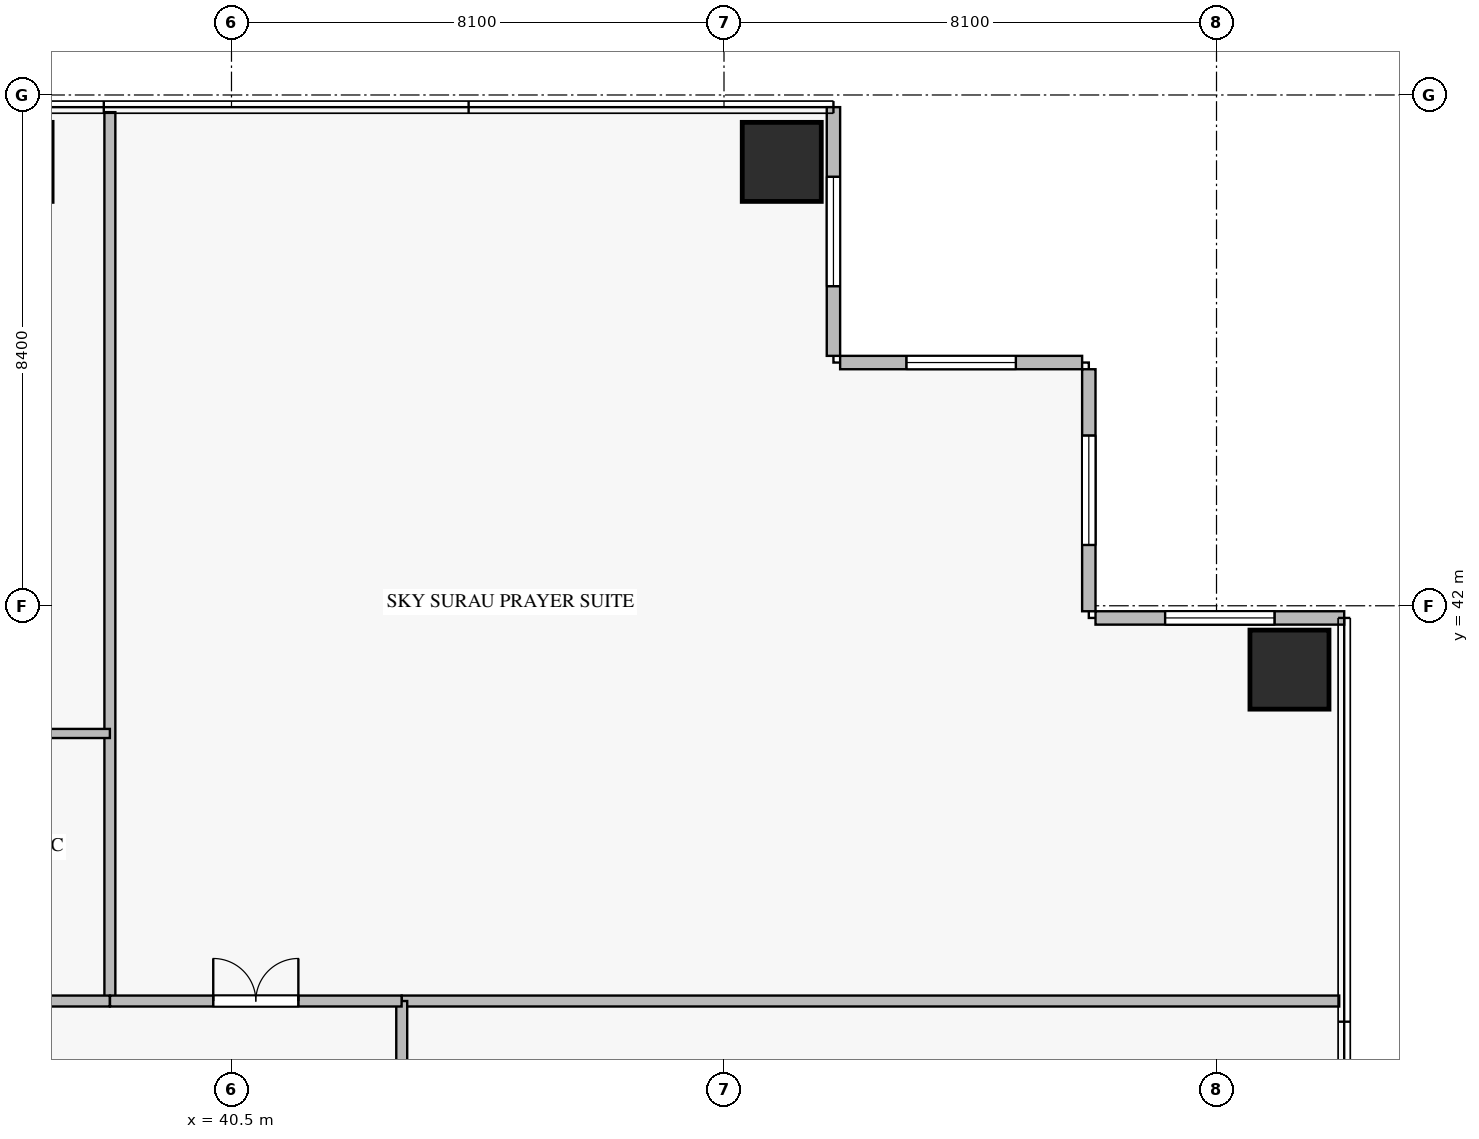
"""IFC4 building model, lengths in metres.
Left out: names, types, materials, properties, quantities, classifications, styles, units other than length and angle.
Written with IfcOpenShell. Run it as: python <this file> out.ifc"""

import sys

from ifc_helpers import new_model, si_unit, direction, frame, frame_2d, origin, origin_2d, place, context, subcontext, project, spatial, rectangle, extrude, source, transform, mapped, element, fill, save


model = new_model("IFC4")
c1 = context("Model", 3, precision=1e-05, world=origin(), true_north=direction((0.0, 1.0)))
c2 = subcontext(c1, "Body", "Model", "MODEL_VIEW")
j1 = project(units=[si_unit("LENGTHUNIT", "METRE"), si_unit("PLANEANGLEUNIT", "RADIAN")], contexts=[c1])
p1 = place(None, origin())
s1 = spatial("IfcSite", under=j1, at=p1, CompositionType="ELEMENT")
p2 = place(p1, origin())
s2 = spatial("IfcBuilding", under=s1, at=p2, CompositionType="ELEMENT")
p3 = place(p2, frame((0.0, 0.0, 115.2)))
s3 = spatial("IfcBuildingStorey", under=s2, at=p3, CompositionType="ELEMENT", Elevation=115.2)
m1 = source(origin(), c2, "Body", "SweptSolid", [
    extrude(rectangle(XDim=1.3, YDim=1.3, at=origin_2d()), origin(), (0.0, 0.0, 1.0), 4.87),
])
for number, where, z_axis, x_axis in (
    (1, (49.55, 49.3, -0.36), (0.0, 0.0, 1.0), (1.0, 0.0, 0.0)),
    (2, (57.9, 40.95, -0.36), (0.0, 0.0, 1.0), (1.0, 0.0, 0.0)),
):
    element("IfcColumn", number, at=place(p3, frame(where, z_axis=z_axis, x_axis=x_axis)), inside=s3, PredefinedType="COLUMN", context=c2, shape_type="MappedRepresentation", body=[
        mapped(m1, transform((0.0, 0.0, 0.0), scale=1.0)),
    ])
p4 = place(p3, frame((58.8, 41.8, 0.0), z_axis=(0.0, 0.0, 1.0), x_axis=(-1.0, 0.0, 0.0)))
e3 = element("IfcWall", 3, at=p4, inside=s3, PredefinedType="ELEMENTEDWALL", context=c2, shape_type="SweptSolid", body=[
    extrude(rectangle(XDim=4.09, YDim=0.22, at=frame_2d((2.045, 0.0))), origin(), (0.0, 0.0, 1.0), 4.495),
])
p5 = place(p4, frame((1.145, 0.0, 0.65)))
e4 = element("IfcOpeningElement", 4, at=p5, cuts=e3, PredefinedType="OPENING", context=c2, shape_type="SweptSolid", body=[
    extrude(rectangle(XDim=1.8, YDim=2.1, at=frame_2d((0.9, 1.05))), frame((0.0, 0.12, 0.0), z_axis=(0.0, -1.0, 0.0), x_axis=(1.0, 0.0, 0.0)), (0.0, 0.0, 1.0), 0.24),
])
p6 = place(p3, frame((54.6, 41.91, 0.0), z_axis=(0.0, 0.0, 1.0), x_axis=(0.0, 1.0, 0.0)))
e5 = element("IfcWall", 5, at=p6, inside=s3, PredefinedType="ELEMENTEDWALL", context=c2, shape_type="SweptSolid", body=[
    extrude(rectangle(XDim=3.98, YDim=0.22, at=frame_2d((1.99, 0.0))), origin(), (0.0, 0.0, 1.0), 4.495),
])
p7 = place(p6, frame((1.09, 0.0, 0.65)))
e6 = element("IfcOpeningElement", 6, at=p7, cuts=e5, PredefinedType="OPENING", context=c2, shape_type="SweptSolid", body=[
    extrude(rectangle(XDim=1.8, YDim=2.1, at=frame_2d((0.9, 1.05))), frame((0.0, 0.12, 0.0), z_axis=(0.0, -1.0, 0.0), x_axis=(1.0, 0.0, 0.0)), (0.0, 0.0, 1.0), 0.24),
])
p8 = place(p3, frame((54.49, 46.0, 0.0), z_axis=(0.0, 0.0, 1.0), x_axis=(-1.0, 0.0, 0.0)))
e7 = element("IfcWall", 7, at=p8, inside=s3, PredefinedType="ELEMENTEDWALL", context=c2, shape_type="SweptSolid", body=[
    extrude(rectangle(XDim=3.98, YDim=0.22, at=frame_2d((1.99, 0.0))), origin(), (0.0, 0.0, 1.0), 4.495),
])
p9 = place(p8, frame((1.09, 0.0, 0.65)))
e8 = element("IfcOpeningElement", 8, at=p9, cuts=e7, PredefinedType="OPENING", context=c2, shape_type="SweptSolid", body=[
    extrude(rectangle(XDim=1.8, YDim=2.1, at=frame_2d((0.9, 1.05))), frame((0.0, 0.12, 0.0), z_axis=(0.0, -1.0, 0.0), x_axis=(1.0, 0.0, 0.0)), (0.0, 0.0, 1.0), 0.24),
])
p10 = place(p3, frame((50.4, 46.11, 0.0), z_axis=(0.0, 0.0, 1.0), x_axis=(0.0, 1.0, 0.0)))
e9 = element("IfcWall", 9, at=p10, inside=s3, PredefinedType="ELEMENTEDWALL", context=c2, shape_type="SweptSolid", body=[
    extrude(rectangle(XDim=4.09, YDim=0.22, at=frame_2d((2.045, 0.0))), origin(), (0.0, 0.0, 1.0), 4.495),
])
p11 = place(p10, frame((1.145, 0.0, 0.65)))
e10 = element("IfcOpeningElement", 10, at=p11, cuts=e9, PredefinedType="OPENING", context=c2, shape_type="SweptSolid", body=[
    extrude(rectangle(XDim=1.8, YDim=2.1, at=frame_2d((0.9, 1.05))), frame((0.0, 0.12, 0.0), z_axis=(0.0, -1.0, 0.0), x_axis=(1.0, 0.0, 0.0)), (0.0, 0.0, 1.0), 0.24),
])
p12 = place(p3, frame((43.3, 35.5, 0.0), z_axis=(0.0, 0.0, 1.0), x_axis=(1.0, 0.0, 0.0)))
e11 = element("IfcWall", 11, at=p12, inside=s3, PredefinedType="PARTITIONING", context=c2, shape_type="SweptSolid", body=[
    extrude(rectangle(XDim=15.418, YDim=0.18, at=frame_2d((7.709, 0.0))), origin(), (0.0, 0.0, 1.0), 4.51),
])
p13 = place(p3, frame((43.3, 14.9, 0.0), z_axis=(0.0, 0.0, 1.0), x_axis=(0.0, 1.0, 0.0)))
e12 = element("IfcWall", 12, at=p13, inside=s3, PredefinedType="PARTITIONING", context=c2, shape_type="SweptSolid", body=[
    extrude(rectangle(XDim=20.6, YDim=0.18, at=frame_2d((10.3, 0.0))), origin(), (0.0, 0.0, 1.0), 4.51),
])
p14 = place(p13, frame((9.55, 0.0, 0.0)))
e13 = element("IfcOpeningElement", 13, at=p14, cuts=e12, PredefinedType="OPENING", context=c2, shape_type="SweptSolid", body=[
    extrude(rectangle(XDim=1.5, YDim=2.25, at=frame_2d((0.75, 1.125))), frame((0.0, 0.1, 0.0), z_axis=(0.0, -1.0, 0.0), x_axis=(1.0, 0.0, 0.0)), (0.0, 0.0, 1.0), 0.2),
])
p15 = place(p3, frame((38.5, 35.5, 0.0), z_axis=(0.0, 0.0, 1.0), x_axis=(0.0, 1.0, 0.0)))
e14 = element("IfcWall", 14, at=p15, inside=s3, PredefinedType="PARTITIONING", context=c2, shape_type="SweptSolid", body=[
    extrude(rectangle(XDim=14.618, YDim=0.18, at=frame_2d((7.309, 0.0))), origin(), (0.0, 0.0, 1.0), 4.51),
])
p16 = place(p3, frame((33.302, 35.5, 0.0), z_axis=(0.0, 0.0, 1.0), x_axis=(1.0, 0.0, 0.0)))
e15 = element("IfcWall", 15, at=p16, inside=s3, PredefinedType="PARTITIONING", context=c2, shape_type="SweptSolid", body=[
    extrude(rectangle(XDim=5.198, YDim=0.18, at=frame_2d((2.599, 0.0))), origin(), (0.0, 0.0, 1.0), 4.51),
])
p17 = place(p16, frame((2.099, 0.0, 0.0)))
e16 = element("IfcOpeningElement", 16, at=p17, cuts=e15, PredefinedType="OPENING", context=c2, shape_type="SweptSolid", body=[
    extrude(rectangle(XDim=1.0, YDim=2.15, at=frame_2d((0.5, 1.075))), frame((0.0, 0.1, 0.0), z_axis=(0.0, -1.0, 0.0), x_axis=(1.0, 0.0, 0.0)), (0.0, 0.0, 1.0), 0.2),
])
p18 = place(p3, frame((38.502, 35.5, 0.0), z_axis=(0.0, 0.0, 1.0), x_axis=(1.0, 0.0, 0.0)))
e17 = element("IfcWall", 17, at=p18, inside=s3, PredefinedType="PARTITIONING", context=c2, shape_type="SweptSolid", body=[
    extrude(rectangle(XDim=4.796, YDim=0.18, at=frame_2d((2.398, 0.0))), origin(), (0.0, 0.0, 1.0), 4.51),
])
p19 = place(p18, frame((1.698, 0.0, 0.0)))
e18 = element("IfcOpeningElement", 18, at=p19, cuts=e17, PredefinedType="OPENING", context=c2, shape_type="SweptSolid", body=[
    extrude(rectangle(XDim=1.4, YDim=2.25, at=frame_2d((0.7, 1.125))), frame((0.0, 0.1, 0.0), z_axis=(0.0, -1.0, 0.0), x_axis=(1.0, 0.0, 0.0)), (0.0, 0.0, 1.0), 0.2),
])
p20 = place(p3, frame((24.8, 39.9, 0.0), z_axis=(0.0, 0.0, 1.0), x_axis=(1.0, 0.0, 0.0)))
e19 = element("IfcWall", 19, at=p20, inside=s3, PredefinedType="PARTITIONING", context=c2, shape_type="SweptSolid", body=[
    extrude(rectangle(XDim=13.7, YDim=0.15, at=frame_2d((6.85, 0.0))), origin(), (0.0, 0.0, 1.0), 4.51),
])
p21 = place(p20, frame((2.304, 0.0, 0.0)))
e20 = element("IfcOpeningElement", 20, at=p21, cuts=e19, PredefinedType="OPENING", context=c2, shape_type="SweptSolid", body=[
    extrude(rectangle(XDim=0.9, YDim=2.1, at=frame_2d((0.45, 1.05))), frame((0.0, 0.085, 0.0), z_axis=(0.0, -1.0, 0.0), x_axis=(1.0, 0.0, 0.0)), (0.0, 0.0, 1.0), 0.17),
])
m2 = source(origin(), c2, "Body", "SweptSolid", [
    extrude(rectangle(XDim=1.8, YDim=2.1, at=frame_2d((0.9, 1.05))), frame((0.0, 0.03, 0.0), z_axis=(0.0, -1.0, 0.0), x_axis=(1.0, 0.0, 0.0)), (0.0, 0.0, 1.0), 0.06),
])
p22 = place(p5, origin())
e21 = element("IfcWindow", 21, at=p22, inside=s3, PartitioningType="SINGLE_PANEL", PredefinedType="WINDOW", context=c2, shape_type="MappedRepresentation", body=[
    mapped(m2, transform((0.0, 0.0, 0.0), scale=1.0)),
])
fill(e4, e21)
p23 = place(p7, origin())
e22 = element("IfcWindow", 22, at=p23, inside=s3, PartitioningType="SINGLE_PANEL", PredefinedType="WINDOW", context=c2, shape_type="MappedRepresentation", body=[
    mapped(m2, transform((0.0, 0.0, 0.0), scale=1.0)),
])
fill(e6, e22)
p24 = place(p9, origin())
e23 = element("IfcWindow", 23, at=p24, inside=s3, PartitioningType="SINGLE_PANEL", PredefinedType="WINDOW", context=c2, shape_type="MappedRepresentation", body=[
    mapped(m2, transform((0.0, 0.0, 0.0), scale=1.0)),
])
fill(e8, e23)
p25 = place(p11, origin())
e24 = element("IfcWindow", 24, at=p25, inside=s3, PartitioningType="SINGLE_PANEL", PredefinedType="WINDOW", context=c2, shape_type="MappedRepresentation", body=[
    mapped(m2, transform((0.0, 0.0, 0.0), scale=1.0)),
])
fill(e10, e24)
m3 = source(origin(), c2, "Body", "SweptSolid", [
    extrude(rectangle(XDim=1.4, YDim=2.25, at=frame_2d((0.7, 1.125))), frame((0.0, 0.025, 0.0), z_axis=(0.0, -1.0, 0.0), x_axis=(1.0, 0.0, 0.0)), (0.0, 0.0, 1.0), 0.05),
])
p26 = place(p19, origin())
e25 = element("IfcDoor", 25, at=p26, inside=s3, OperationType="DOUBLE_DOOR_SINGLE_SWING", PredefinedType="DOOR", context=c2, shape_type="MappedRepresentation", body=[
    mapped(m3, transform((0.0, 0.0, 0.0), scale=1.0)),
])
fill(e18, e25)
save(model, sys.argv[1])
